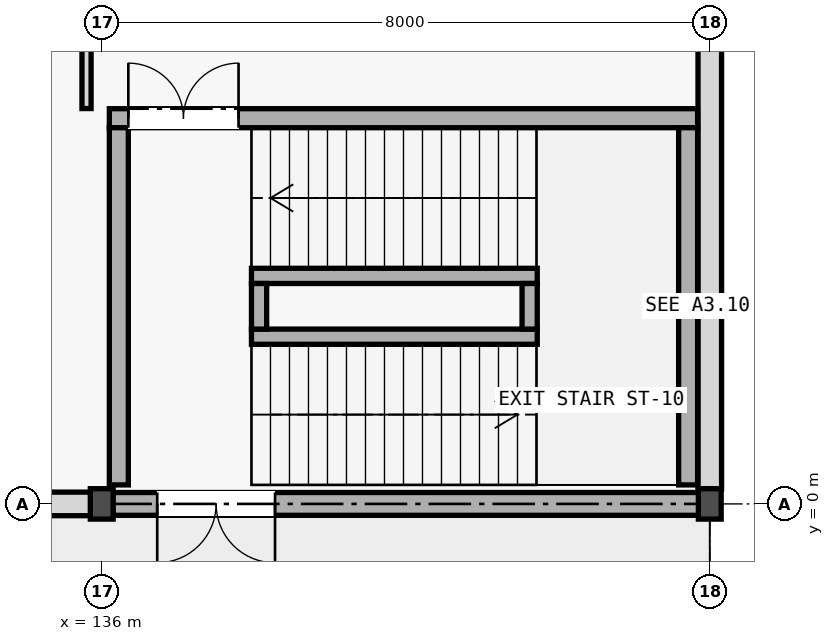
"""IFC4 building model, lengths in metres.
Left out: names, types, materials, properties, quantities, classifications, styles, units other than length and angle.
Written with IfcOpenShell. Run it as: python <this file> out.ifc"""

import sys

from ifc_helpers import new_model, si_unit, direction, frame, frame_2d, origin, origin_2d, place, context, subcontext, project, spatial, rectangle, i_section, extrude, element, fill, save


model = new_model("IFC4")
c1 = context("Model", 3, precision=1e-05, world=origin(), true_north=direction((0.0, 1.0)))
c2 = subcontext(c1, "Body", "Model", "MODEL_VIEW")
j1 = project(units=[si_unit("LENGTHUNIT", "METRE"), si_unit("PLANEANGLEUNIT", "RADIAN")], contexts=[c1])
p1 = place(None, origin())
s1 = spatial("IfcSite", under=j1, at=p1, CompositionType="ELEMENT")
p2 = place(p1, origin())
s2 = spatial("IfcBuilding", under=s1, at=p2, CompositionType="ELEMENT")
p3 = place(p2, origin())
s3 = spatial("IfcBuildingStorey", under=s2, at=p3, CompositionType="ELEMENT", Elevation=0.0)
for number, where, z_axis, x_axis in (
    (1, (136.0, 0.0, 0.0), (0.0, 0.0, 1.0), (1.0, 0.0, 0.0)),
    (2, (144.0, 0.0, 0.0), (0.0, 0.0, 1.0), (1.0, 0.0, 0.0)),
):
    element("IfcColumn", number, at=place(p3, frame(where, z_axis=z_axis, x_axis=x_axis)), inside=s3, PredefinedType="COLUMN", context=c2, shape_type="SweptSolid", body=[
        extrude(i_section(OverallWidth=0.3, OverallDepth=0.4, WebThickness=0.013, FlangeThickness=0.024, at=origin_2d()), origin(), (0.0, 0.0, 1.0), 5.125),
    ])
p4 = place(p3, frame((128.146, 0.0, 0.0), z_axis=(0.0, 0.0, 1.0), x_axis=(1.0, 0.0, 0.0)))
e3 = element("IfcWall", 3, at=p4, inside=s3, PredefinedType="STANDARD", context=c2, shape_type="SweptSolid", body=[
    extrude(rectangle(XDim=7.708, YDim=0.31, at=frame_2d((3.854, 0.0))), origin(), (0.0, 0.0, 1.0), 4.25),
])
p5 = place(p4, frame((2.604, 0.0, 0.0)))
e4 = element("IfcOpeningElement", 4, at=p5, cuts=e3, PredefinedType="OPENING", context=c2, shape_type="SweptSolid", body=[
    extrude(rectangle(XDim=2.5, YDim=2.45, at=frame_2d((1.25, 1.225))), frame((0.0, 0.165, 0.0), z_axis=(0.0, -1.0, 0.0), x_axis=(1.0, 0.0, 0.0)), (0.0, 0.0, 1.0), 0.33),
])
p6 = place(p3, frame((136.146, 0.0, 0.0), z_axis=(0.0, 0.0, 1.0), x_axis=(1.0, 0.0, 0.0)))
e5 = element("IfcWall", 5, at=p6, inside=s3, PredefinedType="SHEAR", context=c2, shape_type="SweptSolid", body=[
    extrude(rectangle(XDim=7.708, YDim=0.3, at=frame_2d((3.854, 0.0))), origin(), (0.0, 0.0, 1.0), 5.4),
])
p7 = place(p6, frame((0.584, 0.0, 0.0)))
e6 = element("IfcOpeningElement", 6, at=p7, cuts=e5, PredefinedType="OPENING", context=c2, shape_type="SweptSolid", body=[
    extrude(rectangle(XDim=1.55, YDim=2.2, at=frame_2d((0.775, 1.1))), frame((0.0, 0.16, 0.0), z_axis=(0.0, -1.0, 0.0), x_axis=(1.0, 0.0, 0.0)), (0.0, 0.0, 1.0), 0.32),
])
p8 = place(p3, frame((144.0, 0.196, 0.0), z_axis=(0.0, 0.0, 1.0), x_axis=(0.0, 1.0, 0.0)))
e7 = element("IfcWall", 7, at=p8, inside=s3, PredefinedType="STANDARD", context=c2, shape_type="SweptSolid", body=[
    extrude(rectangle(XDim=7.483, YDim=0.31, at=frame_2d((3.741, 0.0))), origin(), (0.0, 0.0, 1.0), 4.305),
])
p9 = place(p3, frame((136.1, 5.075, 0.0), z_axis=(0.0, 0.0, 1.0), x_axis=(1.0, 0.0, 0.0)))
e8 = element("IfcWall", 8, at=p9, inside=s3, PredefinedType="SHEAR", context=c2, shape_type="SweptSolid", body=[
    extrude(rectangle(XDim=7.74, YDim=0.25, at=frame_2d((3.87, 0.0))), origin(), (0.0, 0.0, 1.0), 5.4),
])
p10 = place(p9, frame((0.25, 0.0, 0.0)))
e9 = element("IfcOpeningElement", 9, at=p10, cuts=e8, PredefinedType="OPENING", context=c2, shape_type="SweptSolid", body=[
    extrude(rectangle(XDim=1.45, YDim=2.2, at=frame_2d((0.725, 1.1))), frame((0.0, 0.135, 0.0), z_axis=(0.0, -1.0, 0.0), x_axis=(1.0, 0.0, 0.0)), (0.0, 0.0, 1.0), 0.27),
])
for number, where, z_axis, x_axis in (
    (10, (136.225, 0.25, 0.0), (0.0, 0.0, 1.0), (0.0, 1.0, 0.0)),
    (11, (143.715, 0.25, 0.0), (0.0, 0.0, 1.0), (0.0, 1.0, 0.0)),
):
    element("IfcWall", number, at=place(p3, frame(where, z_axis=z_axis, x_axis=x_axis)), inside=s3, PredefinedType="SHEAR", context=c2, shape_type="SweptSolid", body=[
        extrude(rectangle(XDim=4.7, YDim=0.25, at=frame_2d((2.35, 0.0))), origin(), (0.0, 0.0, 1.0), 5.4),
    ])
for number, where, z_axis, x_axis in (
    (12, (137.97, 2.2, 0.0), (0.0, 0.0, 1.0), (1.0, 0.0, 0.0)),
    (13, (137.97, 3.0, 0.0), (0.0, 0.0, 1.0), (1.0, 0.0, 0.0)),
):
    element("IfcWall", number, at=place(p3, frame(where, z_axis=z_axis, x_axis=x_axis)), inside=s3, PredefinedType="SHEAR", context=c2, shape_type="SweptSolid", body=[
        extrude(rectangle(XDim=3.76, YDim=0.2, at=frame_2d((1.88, 0.0))), origin(), (0.0, 0.0, 1.0), 5.4),
    ])
for number, where, z_axis, x_axis in (
    (14, (138.07, 2.3, 0.0), (0.0, 0.0, 1.0), (0.0, 1.0, 0.0)),
    (15, (141.63, 2.3, 0.0), (0.0, 0.0, 1.0), (0.0, 1.0, 0.0)),
):
    element("IfcWall", number, at=place(p3, frame(where, z_axis=z_axis, x_axis=x_axis)), inside=s3, PredefinedType="SHEAR", context=c2, shape_type="SweptSolid", body=[
        extrude(rectangle(XDim=0.6, YDim=0.2, at=frame_2d((0.3, 0.0))), origin(), (0.0, 0.0, 1.0), 5.4),
    ])
p11 = place(p3, frame((135.8, 5.202, 0.0), z_axis=(0.0, 0.0, 1.0), x_axis=(0.0, 1.0, 0.0)))
e16 = element("IfcWall", 16, at=p11, inside=s3, PredefinedType="PARTITIONING", context=c2, shape_type="SweptSolid", body=[
    extrude(rectangle(XDim=2.471, YDim=0.12, at=frame_2d((1.236, 0.0))), origin(), (0.0, 0.0, 1.0), 4.305),
])
p12 = place(p7, frame((1.55, 0.0, 0.0), z_axis=(0.0, 0.0, 1.0), x_axis=(-1.0, 0.0, 0.0)))
e17 = element("IfcDoor", 17, at=p12, inside=s3, OperationType="DOUBLE_DOOR_SINGLE_SWING", PredefinedType="DOOR", context=c2, shape_type="SweptSolid", body=[
    extrude(rectangle(XDim=1.55, YDim=2.2, at=frame_2d((0.775, 1.1))), frame((0.0, 0.025, 0.0), z_axis=(0.0, -1.0, 0.0), x_axis=(1.0, 0.0, 0.0)), (0.0, 0.0, 1.0), 0.05),
])
fill(e6, e17)
p13 = place(p10, origin())
e18 = element("IfcDoor", 18, at=p13, inside=s3, OperationType="DOUBLE_DOOR_SINGLE_SWING", PredefinedType="DOOR", context=c2, shape_type="SweptSolid", body=[
    extrude(rectangle(XDim=1.45, YDim=2.2, at=frame_2d((0.725, 1.1))), frame((0.0, 0.025, 0.0), z_axis=(0.0, -1.0, 0.0), x_axis=(1.0, 0.0, 0.0)), (0.0, 0.0, 1.0), 0.05),
])
fill(e9, e18)
save(model, sys.argv[1])
